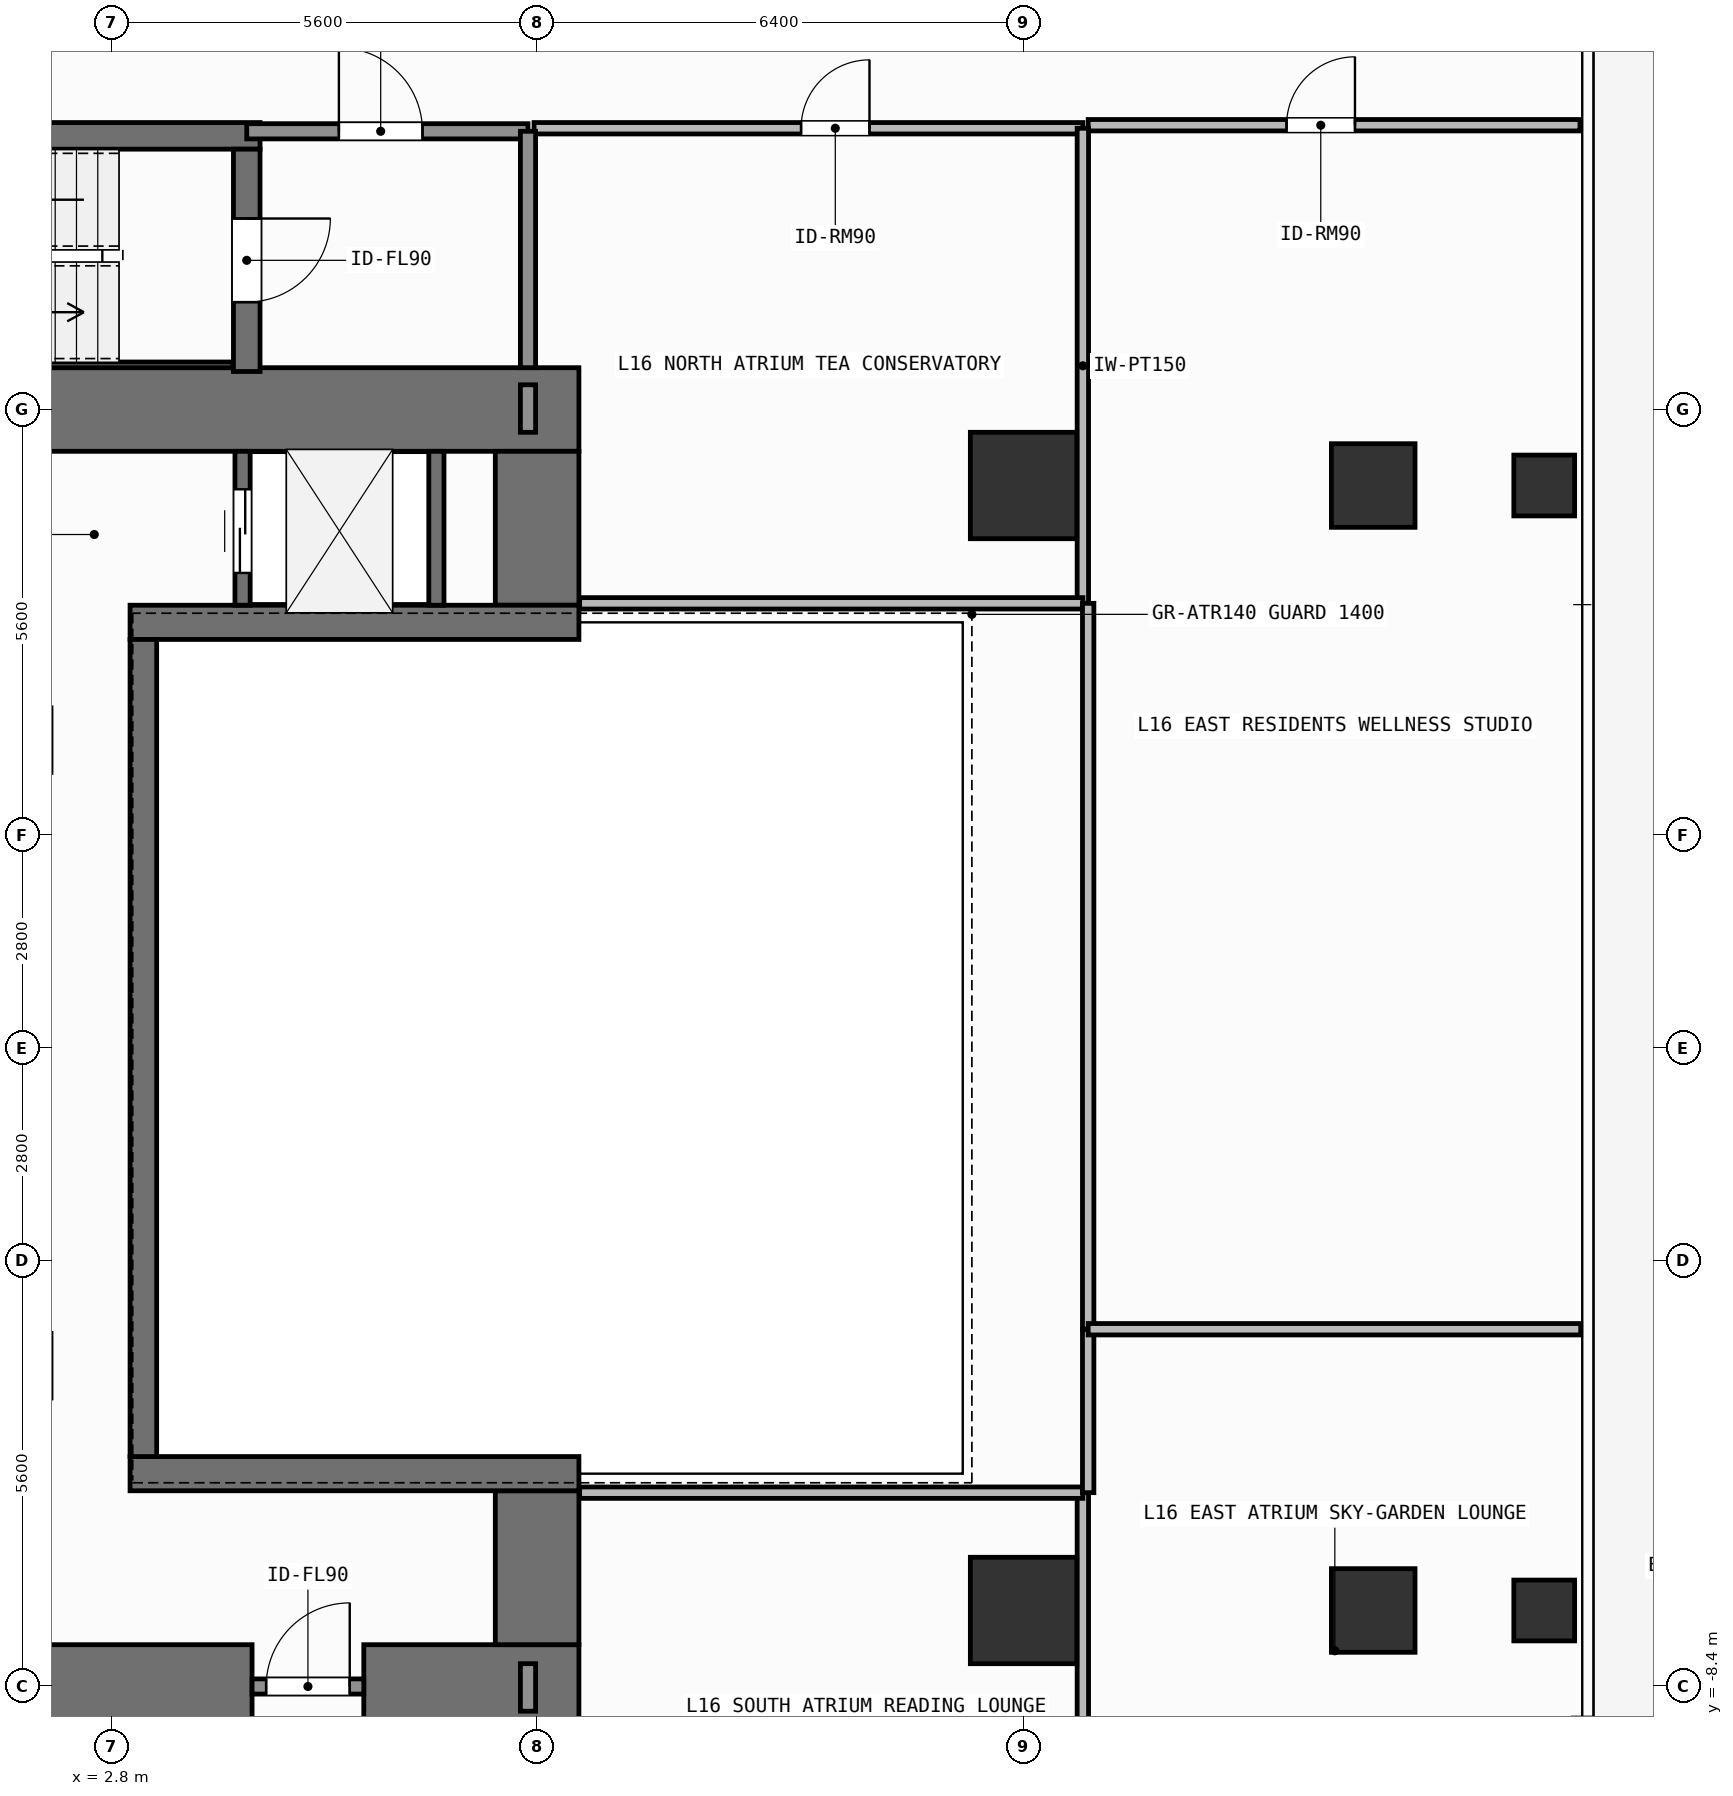
"""IFC4 building model, lengths in metres.
Left out: names, types, materials, properties, quantities, classifications, styles, units other than length and angle.
Written with IfcOpenShell. Run it as: python <this file> out.ifc"""

import sys

from ifc_helpers import new_model, si_unit, direction, frame, frame_2d, origin, origin_2d, place, context, subcontext, project, spatial, rectangle, hollow_rectangle, extrude, element, fill, save


model = new_model("IFC4")
c1 = context("Model", 3, precision=1e-05, world=origin(), true_north=direction((0.0, 1.0)))
c2 = subcontext(c1, "Body", "Model", "MODEL_VIEW")
j1 = project(units=[si_unit("LENGTHUNIT", "METRE"), si_unit("PLANEANGLEUNIT", "RADIAN")], contexts=[c1])
p1 = place(None, origin())
s1 = spatial("IfcSite", under=j1, at=p1, CompositionType="ELEMENT")
p2 = place(p1, origin())
s2 = spatial("IfcBuilding", under=s1, at=p2, CompositionType="ELEMENT")
p3 = place(p2, frame((0.0, 0.0, 61.8)))
s3 = spatial("IfcBuildingStorey", under=s2, at=p3, CompositionType="ELEMENT", Elevation=61.8)
p4 = place(p3, frame((-2.62, -8.4, 0.0), z_axis=(0.0, 0.0, 1.0), x_axis=(1.0, 0.0, 0.0)))
e1 = element("IfcWall", 1, at=p4, inside=s3, PredefinedType="SHEAR", context=c2, shape_type="SweptSolid", body=[
    extrude(rectangle(XDim=7.27, YDim=1.1, at=frame_2d((3.635, 0.0))), origin(), (0.0, 0.0, 1.0), 3.9),
])
p5 = place(p3, frame((6.12, -8.4, 0.0), z_axis=(0.0, 0.0, 1.0), x_axis=(1.0, 0.0, 0.0)))
e2 = element("IfcWall", 2, at=p5, inside=s3, PredefinedType="SHEAR", context=c2, shape_type="SweptSolid", body=[
    extrude(rectangle(XDim=2.83, YDim=1.1, at=frame_2d((1.415, 0.0))), origin(), (0.0, 0.0, 1.0), 3.9),
])
p6 = place(p3, frame((-7.55, 8.4, 0.0), z_axis=(0.0, 0.0, 1.0), x_axis=(1.0, 0.0, 0.0)))
e3 = element("IfcWall", 3, at=p6, inside=s3, PredefinedType="SHEAR", context=c2, shape_type="SweptSolid", body=[
    extrude(rectangle(XDim=16.5, YDim=1.1, at=frame_2d((8.25, 0.0))), origin(), (0.0, 0.0, 1.0), 3.9),
])
for number, where, z_axis, x_axis in (
    (4, (8.4, -7.85, 0.0), (0.0, 0.0, 1.0), (0.0, 1.0, 0.0)),
    (5, (8.4, 5.825, 0.0), (0.0, 0.0, 1.0), (0.0, 1.0, 0.0)),
):
    element("IfcWall", number, at=place(p3, frame(where, z_axis=z_axis, x_axis=x_axis)), inside=s3, PredefinedType="SHEAR", context=c2, shape_type="SweptSolid", body=[
        extrude(rectangle(XDim=2.025, YDim=1.1, at=frame_2d((1.013, 0.0))), origin(), (0.0, 0.0, 1.0), 3.9),
    ])
for number, where, z_axis, x_axis in (
    (6, (3.045, -5.6, 0.0), (0.0, 0.0, 1.0), (1.0, 0.0, 0.0)),
    (7, (3.045, 5.6, 0.0), (0.0, 0.0, 1.0), (1.0, 0.0, 0.0)),
):
    element("IfcWall", number, at=place(p3, frame(where, z_axis=z_axis, x_axis=x_axis)), inside=s3, PredefinedType="SHEAR", context=c2, shape_type="SweptSolid", body=[
        extrude(rectangle(XDim=5.905, YDim=0.45, at=frame_2d((2.953, 0.0))), origin(), (0.0, 0.0, 1.0), 3.9),
    ])
p7 = place(p3, frame((3.22, -5.375, 0.0), z_axis=(0.0, 0.0, 1.0), x_axis=(0.0, 1.0, 0.0)))
e8 = element("IfcWall", 8, at=p7, inside=s3, PredefinedType="SHEAR", context=c2, shape_type="SweptSolid", body=[
    extrude(rectangle(XDim=10.75, YDim=0.35, at=frame_2d((5.375, 0.0))), origin(), (0.0, 0.0, 1.0), 3.9),
])
p8 = place(p3, frame((-2.555, 12.0, 0.0), z_axis=(0.0, 0.0, 1.0), x_axis=(1.0, 0.0, 0.0)))
e9 = element("IfcWall", 9, at=p8, inside=s3, PredefinedType="SHEAR", context=c2, shape_type="SweptSolid", body=[
    extrude(rectangle(XDim=7.31, YDim=0.35, at=frame_2d((3.655, 0.0))), origin(), (0.0, 0.0, 1.0), 3.9),
])
p9 = place(p3, frame((-2.2, 8.988, 0.0), z_axis=(0.0, 0.0, 1.0), x_axis=(1.0, 0.0, 0.0)))
e10 = element("IfcWall", 10, at=p9, inside=s3, PredefinedType="SHEAR", context=c2, shape_type="SweptSolid", body=[
    extrude(rectangle(XDim=6.6, YDim=0.075, at=frame_2d((3.3, 0.0))), origin(), (0.0, 0.0, 1.0), 3.9),
])
p10 = place(p3, frame((4.58, 11.825, 0.0), z_axis=(0.0, 0.0, 1.0), x_axis=(0.0, -1.0, 0.0)))
e11 = element("IfcWall", 11, at=p10, inside=s3, PredefinedType="SHEAR", context=c2, shape_type="SweptSolid", body=[
    extrude(rectangle(XDim=2.925, YDim=0.35, at=frame_2d((1.462, 0.0))), origin(), (0.0, 0.0, 1.0), 3.9),
])
p11 = place(p10, frame((0.913, 0.0, 0.0)))
e12 = element("IfcOpeningElement", 12, at=p11, cuts=e11, PredefinedType="OPENING", context=c2, shape_type="SweptSolid", body=[
    extrude(rectangle(XDim=1.1, YDim=2.15, at=frame_2d((0.55, 1.075))), frame((0.0, 0.185, 0.0), z_axis=(0.0, -1.0, 0.0), x_axis=(1.0, 0.0, 0.0)), (0.0, 0.0, 1.0), 0.37),
])
for number, where, z_axis, x_axis in (
    (13, (14.8, -7.4, 0.0), (0.0, 0.0, 1.0), (1.0, 0.0, 0.0)),
    (14, (14.8, 7.4, 0.0), (0.0, 0.0, 1.0), (1.0, 0.0, 0.0)),
):
    element("IfcColumn", number, at=place(p3, frame(where, z_axis=z_axis, x_axis=x_axis)), inside=s3, PredefinedType="COLUMN", context=c2, shape_type="SweptSolid", body=[
        extrude(rectangle(XDim=1.4, YDim=1.4, at=origin_2d()), origin(), (0.0, 0.0, 1.0), 3.9),
    ])
for number, where, z_axis, x_axis in (
    (15, (19.4, -7.4, 0.0), (0.0, 0.0, 1.0), (1.0, 0.0, 0.0)),
    (16, (19.4, 7.4, 0.0), (0.0, 0.0, 1.0), (1.0, 0.0, 0.0)),
):
    element("IfcColumn", number, at=place(p3, frame(where, z_axis=z_axis, x_axis=x_axis)), inside=s3, PredefinedType="COLUMN", context=c2, shape_type="SweptSolid", body=[
        extrude(rectangle(XDim=1.1, YDim=1.1, at=origin_2d()), origin(), (0.0, 0.0, 1.0), 3.9),
    ])
for number, where, z_axis, x_axis in (
    (17, (21.65, -7.4, 0.0), (0.0, 0.0, 1.0), (1.0, 0.0, 0.0)),
    (18, (21.65, 7.4, 0.0), (0.0, 0.0, 1.0), (1.0, 0.0, 0.0)),
):
    element("IfcColumn", number, at=place(p3, frame(where, z_axis=z_axis, x_axis=x_axis)), inside=s3, PredefinedType="COLUMN", context=c2, shape_type="SweptSolid", body=[
        extrude(hollow_rectangle(XDim=0.8, YDim=0.8, WallThickness=0.036, at=origin_2d()), origin(), (0.0, 0.0, 1.0), 3.9),
    ])
p12 = place(p3, frame((4.525, 5.825, 0.0), z_axis=(0.0, 0.0, 1.0), x_axis=(0.0, 1.0, 0.0)))
e19 = element("IfcWall", 19, at=p12, inside=s3, PredefinedType="SHEAR", context=c2, shape_type="SweptSolid", body=[
    extrude(rectangle(XDim=2.025, YDim=0.2, at=frame_2d((1.013, 0.0))), origin(), (0.0, 0.0, 1.0), 3.68),
])
p13 = place(p12, frame((0.425, 0.0, 0.0)))
e20 = element("IfcOpeningElement", 20, at=p13, cuts=e19, PredefinedType="OPENING", context=c2, shape_type="SweptSolid", body=[
    extrude(rectangle(XDim=1.1, YDim=2.2, at=frame_2d((0.55, 1.1))), frame((0.0, 0.11, 0.0), z_axis=(0.0, -1.0, 0.0), x_axis=(1.0, 0.0, 0.0)), (0.0, 0.0, 1.0), 0.22),
])
p14 = place(p3, frame((7.075, 5.825, 0.0), z_axis=(0.0, 0.0, 1.0), x_axis=(0.0, 1.0, 0.0)))
e21 = element("IfcWall", 21, at=p14, inside=s3, PredefinedType="SHEAR", context=c2, shape_type="SweptSolid", body=[
    extrude(rectangle(XDim=2.025, YDim=0.2, at=frame_2d((1.013, 0.0))), origin(), (0.0, 0.0, 1.0), 3.68),
])
p15 = place(p3, frame((4.65, -8.4, 0.0), z_axis=(0.0, 0.0, 1.0), x_axis=(1.0, 0.0, 0.0)))
e22 = element("IfcWall", 22, at=p15, inside=s3, PredefinedType="SOLIDWALL", context=c2, shape_type="SweptSolid", body=[
    extrude(rectangle(XDim=1.47, YDim=0.2, at=frame_2d((0.735, 0.0))), origin(), (0.0, 0.0, 1.0), 2.72),
])
p16 = place(p15, frame((0.185, 0.0, 0.0)))
e23 = element("IfcOpeningElement", 23, at=p16, cuts=e22, PredefinedType="OPENING", context=c2, shape_type="SweptSolid", body=[
    extrude(rectangle(XDim=1.1, YDim=2.15, at=frame_2d((0.55, 1.075))), frame((0.0, 0.11, 0.0), z_axis=(0.0, -1.0, 0.0), x_axis=(1.0, 0.0, 0.0)), (0.0, 0.0, 1.0), 0.22),
])
p17 = place(p3, frame((4.58, 12.06, 0.0), z_axis=(0.0, 0.0, 1.0), x_axis=(1.0, 0.0, 0.0)))
e24 = element("IfcWall", 24, at=p17, inside=s3, PredefinedType="SOLIDWALL", context=c2, shape_type="SweptSolid", body=[
    extrude(rectangle(XDim=3.7, YDim=0.2, at=frame_2d((1.85, 0.0))), origin(), (0.0, 0.0, 1.0), 3.68),
])
p18 = place(p17, frame((1.212, 0.0, 0.0)))
e25 = element("IfcOpeningElement", 25, at=p18, cuts=e24, PredefinedType="OPENING", context=c2, shape_type="SweptSolid", body=[
    extrude(rectangle(XDim=1.1, YDim=2.15, at=frame_2d((0.55, 1.075))), frame((0.0, 0.11, 0.0), z_axis=(0.0, -1.0, 0.0), x_axis=(1.0, 0.0, 0.0)), (0.0, 0.0, 1.0), 0.22),
])
p19 = place(p3, frame((8.36, 12.1, 0.0), z_axis=(0.0, 0.0, 1.0), x_axis=(1.0, 0.0, 0.0)))
e26 = element("IfcWall", 26, at=p19, inside=s3, PredefinedType="PARTITIONING", context=c2, shape_type="SweptSolid", body=[
    extrude(rectangle(XDim=7.22, YDim=0.15, at=frame_2d((3.61, 0.0))), origin(), (0.0, 0.0, 1.0), 3.68),
])
p20 = place(p19, frame((3.513, 0.0, 0.0)))
e27 = element("IfcOpeningElement", 27, at=p20, cuts=e26, PredefinedType="OPENING", context=c2, shape_type="SweptSolid", body=[
    extrude(rectangle(XDim=0.9, YDim=2.1, at=frame_2d((0.45, 1.05))), frame((0.0, 0.085, 0.0), z_axis=(0.0, -1.0, 0.0), x_axis=(1.0, 0.0, 0.0)), (0.0, 0.0, 1.0), 0.17),
])
p21 = place(p3, frame((15.65, 12.14, 0.0), z_axis=(0.0, 0.0, 1.0), x_axis=(1.0, 0.0, 0.0)))
e28 = element("IfcWall", 28, at=p21, inside=s3, PredefinedType="PARTITIONING", context=c2, shape_type="SweptSolid", body=[
    extrude(rectangle(XDim=6.47, YDim=0.15, at=frame_2d((3.235, 0.0))), origin(), (0.0, 0.0, 1.0), 3.68),
])
p22 = place(p21, frame((2.61, 0.0, 0.0)))
e29 = element("IfcOpeningElement", 29, at=p22, cuts=e28, PredefinedType="OPENING", context=c2, shape_type="SweptSolid", body=[
    extrude(rectangle(XDim=0.9, YDim=2.1, at=frame_2d((0.45, 1.05))), frame((0.0, 0.085, 0.0), z_axis=(0.0, -1.0, 0.0), x_axis=(1.0, 0.0, 0.0)), (0.0, 0.0, 1.0), 0.17),
])
p23 = place(p3, frame((8.28, 8.95, 0.0), z_axis=(0.0, 0.0, 1.0), x_axis=(0.0, 1.0, 0.0)))
e30 = element("IfcWall", 30, at=p23, inside=s3, PredefinedType="SOLIDWALL", context=c2, shape_type="SweptSolid", body=[
    extrude(rectangle(XDim=3.11, YDim=0.2, at=frame_2d((1.555, 0.0))), origin(), (0.0, 0.0, 1.0), 3.68),
])
p24 = place(p3, frame((8.28, -8.725, 0.0), z_axis=(0.0, 0.0, 1.0), x_axis=(0.0, 1.0, 0.0)))
e31 = element("IfcWall", 31, at=p24, inside=s3, PredefinedType="SOLIDWALL", context=c2, shape_type="SweptSolid", body=[
    extrude(rectangle(XDim=0.625, YDim=0.2, at=frame_2d((0.312, 0.0))), origin(), (0.0, 0.0, 1.0), 3.68),
])
p25 = place(p3, frame((15.58, -12.1, 0.0), z_axis=(0.0, 0.0, 1.0), x_axis=(0.0, 1.0, 0.0)))
e32 = element("IfcWall", 32, at=p25, inside=s3, PredefinedType="PARTITIONING", context=c2, shape_type="SweptSolid", body=[
    extrude(rectangle(XDim=6.25, YDim=0.15, at=frame_2d((3.125, 0.0))), origin(), (0.0, 0.0, 1.0), 3.68),
])
p26 = place(p3, frame((8.96, -5.85, 0.0), z_axis=(0.0, 0.0, 1.0), x_axis=(1.0, 0.0, 0.0)))
e33 = element("IfcWall", 33, at=p26, inside=s3, PredefinedType="PARTITIONING", context=c2, shape_type="SweptSolid", body=[
    extrude(rectangle(XDim=6.62, YDim=0.15, at=frame_2d((3.31, 0.0))), origin(), (0.0, 0.0, 1.0), 3.68),
])
p27 = place(p3, frame((8.28, 8.1, 0.0), z_axis=(0.0, 0.0, 1.0), x_axis=(0.0, 1.0, 0.0)))
e34 = element("IfcWall", 34, at=p27, inside=s3, PredefinedType="SOLIDWALL", context=c2, shape_type="SweptSolid", body=[
    extrude(rectangle(XDim=0.625, YDim=0.2, at=frame_2d((0.312, 0.0))), origin(), (0.0, 0.0, 1.0), 3.68),
])
p28 = place(p3, frame((15.58, 5.85, 0.0), z_axis=(0.0, 0.0, 1.0), x_axis=(0.0, 1.0, 0.0)))
e35 = element("IfcWall", 35, at=p28, inside=s3, PredefinedType="PARTITIONING", context=c2, shape_type="SweptSolid", body=[
    extrude(rectangle(XDim=6.25, YDim=0.15, at=frame_2d((3.125, 0.0))), origin(), (0.0, 0.0, 1.0), 3.68),
])
p29 = place(p3, frame((8.96, 5.85, 0.0), z_axis=(0.0, 0.0, 1.0), x_axis=(1.0, 0.0, 0.0)))
e36 = element("IfcWall", 36, at=p29, inside=s3, PredefinedType="PARTITIONING", context=c2, shape_type="SweptSolid", body=[
    extrude(rectangle(XDim=6.62, YDim=0.15, at=frame_2d((3.31, 0.0))), origin(), (0.0, 0.0, 1.0), 3.68),
])
p30 = place(p3, frame((15.65, -5.85, 0.0), z_axis=(0.0, 0.0, 1.0), x_axis=(0.0, 1.0, 0.0)))
e37 = element("IfcWall", 37, at=p30, inside=s3, PredefinedType="PARTITIONING", context=c2, shape_type="SweptSolid", body=[
    extrude(rectangle(XDim=2.15, YDim=0.15, at=frame_2d((1.075, 0.0))), origin(), (0.0, 0.0, 1.0), 3.68),
])
p31 = place(p3, frame((15.65, -3.7, 0.0), z_axis=(0.0, 0.0, 1.0), x_axis=(0.0, 1.0, 0.0)))
e38 = element("IfcWall", 38, at=p31, inside=s3, PredefinedType="PARTITIONING", context=c2, shape_type="SweptSolid", body=[
    extrude(rectangle(XDim=9.55, YDim=0.15, at=frame_2d((4.775, 0.0))), origin(), (0.0, 0.0, 1.0), 3.68),
])
p32 = place(p3, frame((15.65, -3.7, 0.0), z_axis=(0.0, 0.0, 1.0), x_axis=(1.0, 0.0, 0.0)))
e39 = element("IfcWall", 39, at=p32, inside=s3, PredefinedType="PARTITIONING", context=c2, shape_type="SweptSolid", body=[
    extrude(rectangle(XDim=6.48, YDim=0.15, at=frame_2d((3.24, 0.0))), origin(), (0.0, 0.0, 1.0), 3.68),
])
p33 = place(p13, origin())
e40 = element("IfcDoor", 40, at=p33, inside=s3, OperationType="SLIDING_TO_LEFT", PredefinedType="DOOR", context=c2, shape_type="SweptSolid", body=[
    extrude(rectangle(XDim=1.1, YDim=2.2, at=frame_2d((0.55, 1.1))), frame((0.0, 0.025, 0.0), z_axis=(0.0, -1.0, 0.0), x_axis=(1.0, 0.0, 0.0)), (0.0, 0.0, 1.0), 0.05),
])
fill(e20, e40)
p34 = place(p11, origin())
e41 = element("IfcDoor", 41, at=p34, inside=s3, OperationType="SINGLE_SWING_LEFT", PredefinedType="DOOR", context=c2, shape_type="SweptSolid", body=[
    extrude(rectangle(XDim=1.1, YDim=2.15, at=frame_2d((0.55, 1.075))), frame((0.0, 0.025, 0.0), z_axis=(0.0, -1.0, 0.0), x_axis=(1.0, 0.0, 0.0)), (0.0, 0.0, 1.0), 0.05),
])
fill(e12, e41)
p35 = place(p16, origin())
e42 = element("IfcDoor", 42, at=p35, inside=s3, OperationType="SINGLE_SWING_RIGHT", PredefinedType="DOOR", context=c2, shape_type="SweptSolid", body=[
    extrude(rectangle(XDim=1.1, YDim=2.15, at=frame_2d((0.55, 1.075))), frame((0.0, 0.025, 0.0), z_axis=(0.0, -1.0, 0.0), x_axis=(1.0, 0.0, 0.0)), (0.0, 0.0, 1.0), 0.05),
])
fill(e23, e42)
p36 = place(p18, origin())
e43 = element("IfcDoor", 43, at=p36, inside=s3, OperationType="SINGLE_SWING_LEFT", PredefinedType="DOOR", context=c2, shape_type="SweptSolid", body=[
    extrude(rectangle(XDim=1.1, YDim=2.15, at=frame_2d((0.55, 1.075))), frame((0.0, 0.025, 0.0), z_axis=(0.0, -1.0, 0.0), x_axis=(1.0, 0.0, 0.0)), (0.0, 0.0, 1.0), 0.05),
])
fill(e25, e43)
p37 = place(p20, origin())
e44 = element("IfcDoor", 44, at=p37, inside=s3, OperationType="SINGLE_SWING_RIGHT", PredefinedType="DOOR", context=c2, shape_type="SweptSolid", body=[
    extrude(rectangle(XDim=0.9, YDim=2.1, at=frame_2d((0.45, 1.05))), frame((0.0, 0.025, 0.0), z_axis=(0.0, -1.0, 0.0), x_axis=(1.0, 0.0, 0.0)), (0.0, 0.0, 1.0), 0.05),
])
fill(e27, e44)
p38 = place(p22, origin())
e45 = element("IfcDoor", 45, at=p38, inside=s3, OperationType="SINGLE_SWING_RIGHT", PredefinedType="DOOR", context=c2, shape_type="SweptSolid", body=[
    extrude(rectangle(XDim=0.9, YDim=2.1, at=frame_2d((0.45, 1.05))), frame((0.0, 0.025, 0.0), z_axis=(0.0, -1.0, 0.0), x_axis=(1.0, 0.0, 0.0)), (0.0, 0.0, 1.0), 0.05),
])
fill(e29, e45)
save(model, sys.argv[1])
